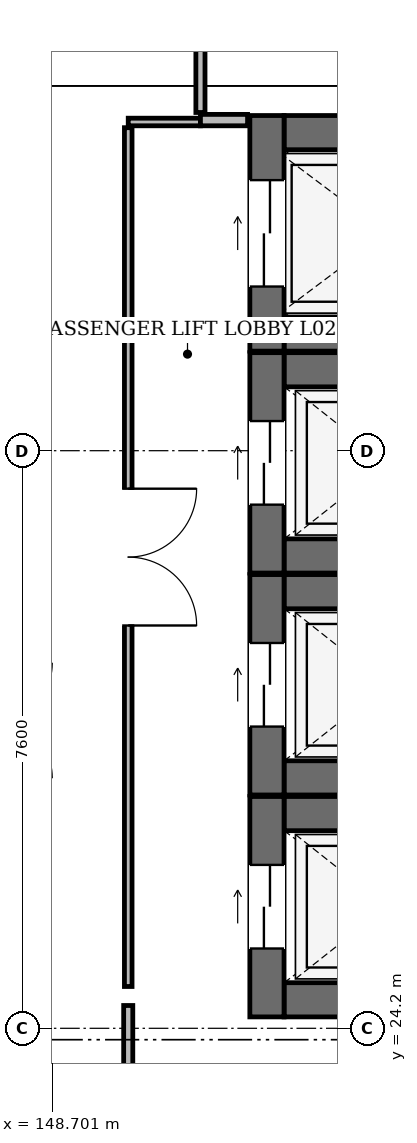
"""IFC4 building model, lengths in metres.
Left out: names, types, materials, properties, quantities, classifications, styles, units other than length and angle.
Written with IfcOpenShell. Run it as: python <this file> out.ifc"""

import sys

from ifc_helpers import new_model, si_unit, direction, frame, frame_2d, origin, place, context, subcontext, project, spatial, rectangle, extrude, element, fill, save


model = new_model("IFC4")
c1 = context("Model", 3, precision=1e-05, world=origin(), true_north=direction((0.0, 1.0)))
c2 = subcontext(c1, "Body", "Model", "MODEL_VIEW")
j1 = project(units=[si_unit("LENGTHUNIT", "METRE"), si_unit("PLANEANGLEUNIT", "RADIAN")], contexts=[c1])
p1 = place(None, origin())
s1 = spatial("IfcSite", under=j1, at=p1, CompositionType="ELEMENT")
p2 = place(p1, origin())
s2 = spatial("IfcBuilding", under=s1, at=p2, CompositionType="ELEMENT")
p3 = place(p2, frame((0.0, 0.0, 10.2)))
s3 = spatial("IfcBuildingStorey", under=s2, at=p3, CompositionType="ELEMENT", Elevation=10.2)
for number, where, z_axis, x_axis in (
    (1, (151.75, 24.575, 0.0), (0.0, 0.0, 1.0), (1.0, 0.0, 0.0)),
    (2, (151.75, 27.025, 0.0), (0.0, 0.0, 1.0), (1.0, 0.0, 0.0)),
):
    element("IfcWall", number, at=place(p3, frame(where, z_axis=z_axis, x_axis=x_axis)), inside=s3, PredefinedType="SHEAR", context=c2, shape_type="SweptSolid", body=[
        extrude(rectangle(XDim=2.7, YDim=0.45, at=frame_2d((1.35, 0.0))), origin(), (0.0, 0.0, 1.0), 4.51),
    ])
p4 = place(p3, frame((151.525, 24.35, 0.0), z_axis=(0.0, 0.0, 1.0), x_axis=(0.0, 1.0, 0.0)))
e3 = element("IfcWall", 3, at=p4, inside=s3, PredefinedType="SHEAR", context=c2, shape_type="SweptSolid", body=[
    extrude(rectangle(XDim=2.9, YDim=0.45, at=frame_2d((1.45, 0.0))), origin(), (0.0, 0.0, 1.0), 4.51),
])
p5 = place(p4, frame((0.9, 0.0, 0.0)))
e4 = element("IfcOpeningElement", 4, at=p5, cuts=e3, PredefinedType="OPENING", context=c2, shape_type="SweptSolid", body=[
    extrude(rectangle(XDim=1.1, YDim=2.2, at=frame_2d((0.55, 1.1))), frame((0.0, 0.237, 0.0), z_axis=(0.0, -1.0, 0.0), x_axis=(1.0, 0.0, 0.0)), (0.0, 0.0, 1.0), 0.474),
])
for number, where, z_axis, x_axis in (
    (5, (151.75, 27.495, 0.0), (0.0, 0.0, 1.0), (1.0, 0.0, 0.0)),
    (6, (151.75, 29.945, 0.0), (0.0, 0.0, 1.0), (1.0, 0.0, 0.0)),
):
    element("IfcWall", number, at=place(p3, frame(where, z_axis=z_axis, x_axis=x_axis)), inside=s3, PredefinedType="SHEAR", context=c2, shape_type="SweptSolid", body=[
        extrude(rectangle(XDim=2.7, YDim=0.45, at=frame_2d((1.35, 0.0))), origin(), (0.0, 0.0, 1.0), 4.51),
    ])
p6 = place(p3, frame((151.525, 27.27, 0.0), z_axis=(0.0, 0.0, 1.0), x_axis=(0.0, 1.0, 0.0)))
e7 = element("IfcWall", 7, at=p6, inside=s3, PredefinedType="SHEAR", context=c2, shape_type="SweptSolid", body=[
    extrude(rectangle(XDim=2.9, YDim=0.45, at=frame_2d((1.45, 0.0))), origin(), (0.0, 0.0, 1.0), 4.51),
])
p7 = place(p6, frame((0.9, 0.0, 0.0)))
e8 = element("IfcOpeningElement", 8, at=p7, cuts=e7, PredefinedType="OPENING", context=c2, shape_type="SweptSolid", body=[
    extrude(rectangle(XDim=1.1, YDim=2.2, at=frame_2d((0.55, 1.1))), frame((0.0, 0.237, 0.0), z_axis=(0.0, -1.0, 0.0), x_axis=(1.0, 0.0, 0.0)), (0.0, 0.0, 1.0), 0.474),
])
for number, where, z_axis, x_axis in (
    (9, (151.75, 30.415, 0.0), (0.0, 0.0, 1.0), (1.0, 0.0, 0.0)),
    (10, (151.75, 32.865, 0.0), (0.0, 0.0, 1.0), (1.0, 0.0, 0.0)),
):
    element("IfcWall", number, at=place(p3, frame(where, z_axis=z_axis, x_axis=x_axis)), inside=s3, PredefinedType="SHEAR", context=c2, shape_type="SweptSolid", body=[
        extrude(rectangle(XDim=2.7, YDim=0.45, at=frame_2d((1.35, 0.0))), origin(), (0.0, 0.0, 1.0), 4.51),
    ])
p8 = place(p3, frame((151.525, 30.19, 0.0), z_axis=(0.0, 0.0, 1.0), x_axis=(0.0, 1.0, 0.0)))
e11 = element("IfcWall", 11, at=p8, inside=s3, PredefinedType="SHEAR", context=c2, shape_type="SweptSolid", body=[
    extrude(rectangle(XDim=2.9, YDim=0.45, at=frame_2d((1.45, 0.0))), origin(), (0.0, 0.0, 1.0), 4.51),
])
p9 = place(p8, frame((0.9, 0.0, 0.0)))
e12 = element("IfcOpeningElement", 12, at=p9, cuts=e11, PredefinedType="OPENING", context=c2, shape_type="SweptSolid", body=[
    extrude(rectangle(XDim=1.1, YDim=2.2, at=frame_2d((0.55, 1.1))), frame((0.0, 0.237, 0.0), z_axis=(0.0, -1.0, 0.0), x_axis=(1.0, 0.0, 0.0)), (0.0, 0.0, 1.0), 0.474),
])
for number, where, z_axis, x_axis in (
    (13, (151.75, 33.335, 0.0), (0.0, 0.0, 1.0), (1.0, 0.0, 0.0)),
    (14, (151.75, 35.985, 0.0), (0.0, 0.0, 1.0), (1.0, 0.0, 0.0)),
):
    element("IfcWall", number, at=place(p3, frame(where, z_axis=z_axis, x_axis=x_axis)), inside=s3, PredefinedType="SHEAR", context=c2, shape_type="SweptSolid", body=[
        extrude(rectangle(XDim=2.7, YDim=0.45, at=frame_2d((1.35, 0.0))), origin(), (0.0, 0.0, 1.0), 4.51),
    ])
p10 = place(p3, frame((151.525, 33.11, 0.0), z_axis=(0.0, 0.0, 1.0), x_axis=(0.0, 1.0, 0.0)))
e15 = element("IfcWall", 15, at=p10, inside=s3, PredefinedType="SHEAR", context=c2, shape_type="SweptSolid", body=[
    extrude(rectangle(XDim=3.1, YDim=0.45, at=frame_2d((1.55, 0.0))), origin(), (0.0, 0.0, 1.0), 4.51),
])
p11 = place(p10, frame((0.85, 0.0, 0.0)))
e16 = element("IfcOpeningElement", 16, at=p11, cuts=e15, PredefinedType="OPENING", context=c2, shape_type="SweptSolid", body=[
    extrude(rectangle(XDim=1.4, YDim=2.3, at=frame_2d((0.7, 1.15))), frame((0.0, 0.237, 0.0), z_axis=(0.0, -1.0, 0.0), x_axis=(1.0, 0.0, 0.0)), (0.0, 0.0, 1.0), 0.474),
])
p12 = place(p3, frame((149.7, 24.75, 0.0), z_axis=(0.0, 0.0, 1.0), x_axis=(0.0, 1.0, 0.0)))
e17 = element("IfcWall", 17, at=p12, inside=s3, PredefinedType="PARTITIONING", context=c2, shape_type="SweptSolid", body=[
    extrude(rectangle(XDim=11.3, YDim=0.1, at=frame_2d((5.65, 0.0))), origin(), (0.0, 0.0, 1.0), 4.405),
])
p13 = place(p12, frame((4.75, 0.0, 0.0)))
e18 = element("IfcOpeningElement", 18, at=p13, cuts=e17, PredefinedType="OPENING", context=c2, shape_type="SweptSolid", body=[
    extrude(rectangle(XDim=1.8, YDim=2.4, at=frame_2d((0.9, 1.2))), frame((0.0, 0.062, 0.0), z_axis=(0.0, -1.0, 0.0), x_axis=(1.0, 0.0, 0.0)), (0.0, 0.0, 1.0), 0.124),
])
p14 = place(p3, frame((149.7, 36.125, 0.0), z_axis=(0.0, 0.0, 1.0), x_axis=(1.0, 0.0, 0.0)))
e19 = element("IfcWall", 19, at=p14, inside=s3, PredefinedType="PARTITIONING", context=c2, shape_type="SweptSolid", body=[
    extrude(rectangle(XDim=0.95, YDim=0.1, at=frame_2d((0.475, 0.0))), origin(), (0.0, 0.0, 1.0), 4.405),
])
p15 = place(p3, frame((150.65, 36.15, 0.0), z_axis=(0.0, 0.0, 1.0), x_axis=(1.0, 0.0, 0.0)))
e20 = element("IfcWall", 20, at=p15, inside=s3, PredefinedType="PARTITIONING", context=c2, shape_type="SweptSolid", body=[
    extrude(rectangle(XDim=0.62, YDim=0.15, at=frame_2d((0.31, 0.0))), origin(), (0.0, 0.0, 1.0), 4.405),
])
p16 = place(p3, frame((149.7, 24.5, 0.0), z_axis=(0.0, 0.0, 1.0), x_axis=(0.0, -1.0, 0.0)))
e21 = element("IfcWall", 21, at=p16, inside=s3, PredefinedType="PARTITIONING", context=c2, shape_type="SweptSolid", body=[
    extrude(rectangle(XDim=0.8, YDim=0.12, at=frame_2d((0.4, 0.0))), origin(), (0.0, 0.0, 1.0), 4.405),
])
p17 = place(p3, frame((150.65, 47.6, 0.0), z_axis=(0.0, 0.0, 1.0), x_axis=(0.0, -1.0, 0.0)))
e22 = element("IfcWall", 22, at=p17, inside=s3, PredefinedType="PARTITIONING", context=c2, shape_type="SweptSolid", body=[
    extrude(rectangle(XDim=11.35, YDim=0.12, at=frame_2d((5.675, 0.0))), origin(), (0.0, 0.0, 1.0), 4.405),
])
p18 = place(p5, origin())
e23 = element("IfcDoor", 23, at=p18, inside=s3, OperationType="DOUBLE_DOOR_SLIDING", PredefinedType="DOOR", context=c2, shape_type="SweptSolid", body=[
    extrude(rectangle(XDim=1.1, YDim=2.2, at=frame_2d((0.55, 1.1))), frame((0.0, 0.025, 0.0), z_axis=(0.0, -1.0, 0.0), x_axis=(1.0, 0.0, 0.0)), (0.0, 0.0, 1.0), 0.05),
])
fill(e4, e23)
p19 = place(p7, origin())
e24 = element("IfcDoor", 24, at=p19, inside=s3, OperationType="DOUBLE_DOOR_SLIDING", PredefinedType="DOOR", context=c2, shape_type="SweptSolid", body=[
    extrude(rectangle(XDim=1.1, YDim=2.2, at=frame_2d((0.55, 1.1))), frame((0.0, 0.025, 0.0), z_axis=(0.0, -1.0, 0.0), x_axis=(1.0, 0.0, 0.0)), (0.0, 0.0, 1.0), 0.05),
])
fill(e8, e24)
p20 = place(p9, origin())
e25 = element("IfcDoor", 25, at=p20, inside=s3, OperationType="DOUBLE_DOOR_SLIDING", PredefinedType="DOOR", context=c2, shape_type="SweptSolid", body=[
    extrude(rectangle(XDim=1.1, YDim=2.2, at=frame_2d((0.55, 1.1))), frame((0.0, 0.025, 0.0), z_axis=(0.0, -1.0, 0.0), x_axis=(1.0, 0.0, 0.0)), (0.0, 0.0, 1.0), 0.05),
])
fill(e12, e25)
p21 = place(p11, origin())
e26 = element("IfcDoor", 26, at=p21, inside=s3, OperationType="DOUBLE_DOOR_SLIDING", PredefinedType="DOOR", context=c2, shape_type="SweptSolid", body=[
    extrude(rectangle(XDim=1.4, YDim=2.3, at=frame_2d((0.7, 1.15))), frame((0.0, 0.025, 0.0), z_axis=(0.0, -1.0, 0.0), x_axis=(1.0, 0.0, 0.0)), (0.0, 0.0, 1.0), 0.05),
])
fill(e16, e26)
p22 = place(p13, frame((1.8, 0.0, 0.0), z_axis=(0.0, 0.0, 1.0), x_axis=(-1.0, 0.0, 0.0)))
e27 = element("IfcDoor", 27, at=p22, inside=s3, OperationType="DOUBLE_DOOR_SINGLE_SWING", PredefinedType="DOOR", context=c2, shape_type="SweptSolid", body=[
    extrude(rectangle(XDim=1.8, YDim=2.4, at=frame_2d((0.9, 1.2))), frame((0.0, 0.025, 0.0), z_axis=(0.0, -1.0, 0.0), x_axis=(1.0, 0.0, 0.0)), (0.0, 0.0, 1.0), 0.05),
])
fill(e18, e27)
save(model, sys.argv[1])
